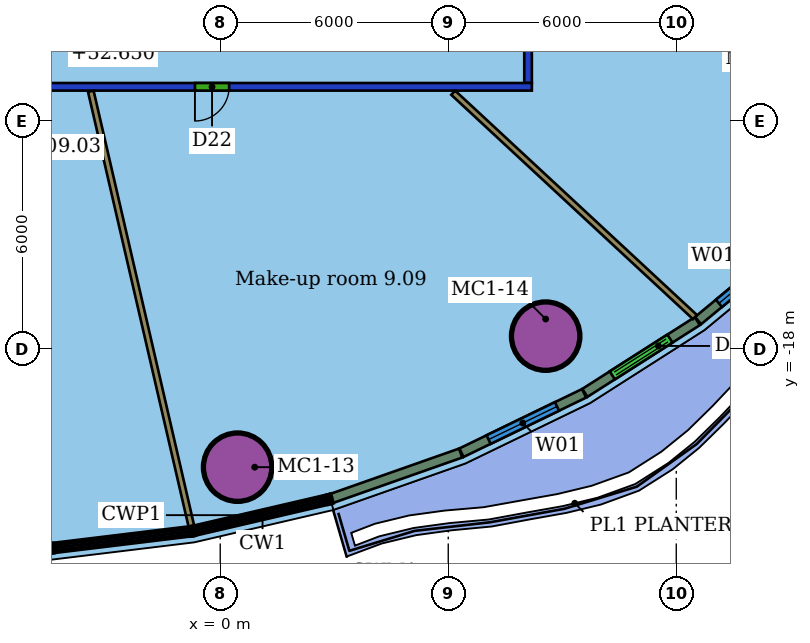
"""IFC4 building model, lengths in metres.
Left out: names, types, materials, properties, quantities, classifications, styles, units other than length and angle.
Written with IfcOpenShell. Run it as: python <this file> out.ifc"""

import sys

from ifc_helpers import new_model, si_unit, direction, frame, frame_2d, origin, origin_2d, place, context, subcontext, project, spatial, rectangle, hollow_circle, extrude, element, fill, save


model = new_model("IFC4")
c1 = context("Model", 3, precision=1e-05, world=origin(), true_north=direction((0.0, 1.0)))
c2 = subcontext(c1, "Body", "Model", "MODEL_VIEW")
j1 = project(units=[si_unit("LENGTHUNIT", "METRE"), si_unit("PLANEANGLEUNIT", "RADIAN")], contexts=[c1])
p1 = place(None, origin())
s1 = spatial("IfcSite", under=j1, at=p1, CompositionType="ELEMENT")
p2 = place(p1, origin())
s2 = spatial("IfcBuilding", under=s1, at=p2, CompositionType="ELEMENT")
p3 = place(p2, frame((0.0, 0.0, 50.8)))
s3 = spatial("IfcBuildingStorey", under=s2, at=p3, CompositionType="ELEMENT", Elevation=50.8)
for number, where, z_axis, x_axis in (
    (1, (0.458, -21.108, 0.0), (0.0, 0.0, 1.0), (1.0, 0.0, 0.0)),
    (2, (8.563, -17.66, 0.0), (0.0, 0.0, 1.0), (1.0, 0.0, 0.0)),
):
    element("IfcColumn", number, at=place(p3, frame(where, z_axis=z_axis, x_axis=x_axis)), inside=s3, PredefinedType="COLUMN", context=c2, shape_type="SweptSolid", body=[
        extrude(hollow_circle(Radius=0.9, WallThickness=0.06, at=origin_2d()), origin(), (0.0, 0.0, 1.0), 3.55),
    ])
p4 = place(p3, frame((8.2, -11.1, 0.0), z_axis=(0.0, 0.0, 1.0), x_axis=(-1.0, 0.0, 0.0)))
e3 = element("IfcWall", 3, at=p4, inside=s3, PredefinedType="PARTITIONING", context=c2, shape_type="SweptSolid", body=[
    extrude(rectangle(XDim=28.4, YDim=0.2, at=frame_2d((14.2, 0.0))), origin(), (0.0, 0.0, 1.0), 2.85),
])
p5 = place(p4, frame((24.814, 0.0, 0.0)))
e4 = element("IfcOpeningElement", 4, at=p5, cuts=e3, PredefinedType="OPENING", context=c2, shape_type="SweptSolid", body=[
    extrude(rectangle(XDim=1.0, YDim=2.1, at=frame_2d((0.5, 1.05))), frame((0.0, 0.11, 0.0), z_axis=(0.0, -1.0, 0.0), x_axis=(1.0, 0.0, 0.0)), (0.0, 0.0, 1.0), 0.22),
])
p6 = place(p4, frame((18.447, 0.0, 0.0)))
e5 = element("IfcOpeningElement", 5, at=p6, cuts=e3, PredefinedType="OPENING", context=c2, shape_type="SweptSolid", body=[
    extrude(rectangle(XDim=1.8, YDim=2.1, at=frame_2d((0.9, 1.05))), frame((0.0, 0.11, 0.0), z_axis=(0.0, -1.0, 0.0), x_axis=(1.0, 0.0, 0.0)), (0.0, 0.0, 1.0), 0.22),
])
p7 = place(p4, frame((7.966, 0.0, 0.0)))
e6 = element("IfcOpeningElement", 6, at=p7, cuts=e3, PredefinedType="OPENING", context=c2, shape_type="SweptSolid", body=[
    extrude(rectangle(XDim=0.9, YDim=2.1, at=frame_2d((0.45, 1.05))), frame((0.0, 0.11, 0.0), z_axis=(0.0, -1.0, 0.0), x_axis=(1.0, 0.0, 0.0)), (0.0, 0.0, 1.0), 0.22),
])
p8 = place(p3, frame((8.1, 11.0, 0.0), z_axis=(0.0, 0.0, 1.0), x_axis=(0.0, -1.0, 0.0)))
e7 = element("IfcWall", 7, at=p8, inside=s3, PredefinedType="PARTITIONING", context=c2, shape_type="SweptSolid", body=[
    extrude(rectangle(XDim=22.0, YDim=0.2, at=frame_2d((11.0, 0.0))), origin(), (0.0, 0.0, 1.0), 2.85),
])
p9 = place(p8, frame((2.56, 0.0, 0.0)))
e8 = element("IfcOpeningElement", 8, at=p9, cuts=e7, PredefinedType="OPENING", context=c2, shape_type="SweptSolid", body=[
    extrude(rectangle(XDim=1.1, YDim=2.1, at=frame_2d((0.55, 1.05))), frame((0.0, 0.11, 0.0), z_axis=(0.0, -1.0, 0.0), x_axis=(1.0, 0.0, 0.0)), (0.0, 0.0, 1.0), 0.22),
])
p10 = place(p8, frame((15.468, 0.0, 0.0)))
e9 = element("IfcOpeningElement", 9, at=p10, cuts=e7, PredefinedType="OPENING", context=c2, shape_type="SweptSolid", body=[
    extrude(rectangle(XDim=1.8, YDim=2.1, at=frame_2d((0.9, 1.05))), frame((0.0, 0.11, 0.0), z_axis=(0.0, -1.0, 0.0), x_axis=(1.0, 0.0, 0.0)), (0.0, 0.0, 1.0), 0.22),
])
p11 = place(p8, frame((7.453, 0.0, 0.0)))
e10 = element("IfcOpeningElement", 10, at=p11, cuts=e7, PredefinedType="OPENING", context=c2, shape_type="SweptSolid", body=[
    extrude(rectangle(XDim=0.9, YDim=2.1, at=frame_2d((0.45, 1.05))), frame((0.0, 0.11, 0.0), z_axis=(0.0, -1.0, 0.0), x_axis=(1.0, 0.0, 0.0)), (0.0, 0.0, 1.0), 0.22),
])
p12 = place(p3, frame((-0.758, -22.668, 0.0), z_axis=(0.0, 0.0, 1.0), x_axis=(-0.225313080514, 0.974286413612, 0.0)))
e11 = element("IfcWall", 11, at=p12, inside=s3, PredefinedType="PARTITIONING", context=c2, shape_type="SweptSolid", body=[
    extrude(rectangle(XDim=11.753, YDim=0.15, at=frame_2d((5.877, 0.0))), origin(), (0.0, 0.0, 1.0), 3.55),
])
p13 = place(p3, frame((12.491, -17.157, 0.0), z_axis=(0.0, 0.0, 1.0), x_axis=(-0.733043944871, 0.680181280901, 0.0)))
e12 = element("IfcWall", 12, at=p13, inside=s3, PredefinedType="PARTITIONING", context=c2, shape_type="SweptSolid", body=[
    extrude(rectangle(XDim=8.678, YDim=0.15, at=frame_2d((4.339, 0.0))), origin(), (0.0, 0.0, 1.0), 3.55),
])
p14 = place(p3, frame((2.929, -21.932, 0.0), z_axis=(0.0, 0.0, 1.0), x_axis=(0.943313962697, 0.331901744168, 0.0)))
e13 = element("IfcWall", 13, at=p14, inside=s3, PredefinedType="SOLIDWALL", context=c2, shape_type="SweptSolid", body=[
    extrude(rectangle(XDim=3.602, YDim=0.25, at=frame_2d((1.801, 0.0))), origin(), (0.0, 0.0, 1.0), 3.15),
])
p15 = place(p3, frame((6.347, -20.728, 0.0), z_axis=(0.0, 0.0, 1.0), x_axis=(0.899966299965, 0.435959469363, 0.0)))
e14 = element("IfcWall", 14, at=p15, inside=s3, PredefinedType="SOLIDWALL", context=c2, shape_type="SweptSolid", body=[
    extrude(rectangle(XDim=3.586, YDim=0.25, at=frame_2d((1.793, 0.0))), origin(), (0.0, 0.0, 1.0), 3.15),
])
p16 = place(p15, frame((0.793, 0.0, 0.8)))
e15 = element("IfcOpeningElement", 15, at=p16, cuts=e14, PredefinedType="OPENING", context=c2, shape_type="SweptSolid", body=[
    extrude(rectangle(XDim=2.0, YDim=2.2, at=frame_2d((1.0, 1.1))), frame((0.0, 0.135, 0.0), z_axis=(0.0, -1.0, 0.0), x_axis=(1.0, 0.0, 0.0)), (0.0, 0.0, 1.0), 0.27),
])
p17 = place(p3, frame((9.595, -19.154, 0.0), z_axis=(0.0, 0.0, 1.0), x_axis=(0.843008079685, 0.53790089941, 0.0)))
e16 = element("IfcWall", 16, at=p17, inside=s3, PredefinedType="SOLIDWALL", context=c2, shape_type="SweptSolid", body=[
    extrude(rectangle(XDim=3.511, YDim=0.25, at=frame_2d((1.756, 0.0))), origin(), (0.0, 0.0, 1.0), 3.15),
])
p18 = place(p17, frame((0.856, 0.0, 0.0)))
e17 = element("IfcOpeningElement", 17, at=p18, cuts=e16, PredefinedType="OPENING", context=c2, shape_type="SweptSolid", body=[
    extrude(rectangle(XDim=1.8, YDim=2.4, at=frame_2d((0.9, 1.2))), frame((0.0, 0.135, 0.0), z_axis=(0.0, -1.0, 0.0), x_axis=(1.0, 0.0, 0.0)), (0.0, 0.0, 1.0), 0.27),
])
p19 = place(p3, frame((12.573, -17.251, 0.0), z_axis=(0.0, 0.0, 1.0), x_axis=(0.771145821292, 0.636658560222, 0.0)))
e18 = element("IfcWall", 18, at=p19, inside=s3, PredefinedType="SOLIDWALL", context=c2, shape_type="SweptSolid", body=[
    extrude(rectangle(XDim=3.426, YDim=0.25, at=frame_2d((1.713, 0.0))), origin(), (0.0, 0.0, 1.0), 3.15),
])
p20 = place(p19, frame((0.713, 0.0, 0.8)))
e19 = element("IfcOpeningElement", 19, at=p20, cuts=e18, PredefinedType="OPENING", context=c2, shape_type="SweptSolid", body=[
    extrude(rectangle(XDim=2.0, YDim=2.2, at=frame_2d((1.0, 1.1))), frame((0.0, 0.135, 0.0), z_axis=(0.0, -1.0, 0.0), x_axis=(1.0, 0.0, 0.0)), (0.0, 0.0, 1.0), 0.27),
])
p21 = place(p7, origin())
e20 = element("IfcDoor", 20, at=p21, inside=s3, OperationType="SINGLE_SWING_RIGHT", PredefinedType="DOOR", context=c2, shape_type="SweptSolid", body=[
    extrude(rectangle(XDim=0.9, YDim=2.1, at=frame_2d((0.45, 1.05))), frame((0.0, 0.025, 0.0), z_axis=(0.0, -1.0, 0.0), x_axis=(1.0, 0.0, 0.0)), (0.0, 0.0, 1.0), 0.05),
])
fill(e6, e20)
p22 = place(p16, origin())
e21 = element("IfcWindow", 21, at=p22, inside=s3, PartitioningType="SINGLE_PANEL", PredefinedType="WINDOW", context=c2, shape_type="SweptSolid", body=[
    extrude(rectangle(XDim=2.0, YDim=2.2, at=frame_2d((1.0, 1.1))), frame((0.0, 0.03, 0.0), z_axis=(0.0, -1.0, 0.0), x_axis=(1.0, 0.0, 0.0)), (0.0, 0.0, 1.0), 0.06),
])
fill(e15, e21)
p23 = place(p18, origin())
e22 = element("IfcDoor", 22, at=p23, inside=s3, OperationType="DOUBLE_DOOR_SLIDING", PredefinedType="DOOR", context=c2, shape_type="SweptSolid", body=[
    extrude(rectangle(XDim=1.8, YDim=2.4, at=frame_2d((0.9, 1.2))), frame((0.0, 0.025, 0.0), z_axis=(0.0, -1.0, 0.0), x_axis=(1.0, 0.0, 0.0)), (0.0, 0.0, 1.0), 0.05),
])
fill(e17, e22)
p24 = place(p20, origin())
e23 = element("IfcWindow", 23, at=p24, inside=s3, PartitioningType="SINGLE_PANEL", PredefinedType="WINDOW", context=c2, shape_type="SweptSolid", body=[
    extrude(rectangle(XDim=2.0, YDim=2.2, at=frame_2d((1.0, 1.1))), frame((0.0, 0.03, 0.0), z_axis=(0.0, -1.0, 0.0), x_axis=(1.0, 0.0, 0.0)), (0.0, 0.0, 1.0), 0.06),
])
fill(e19, e23)
save(model, sys.argv[1])
